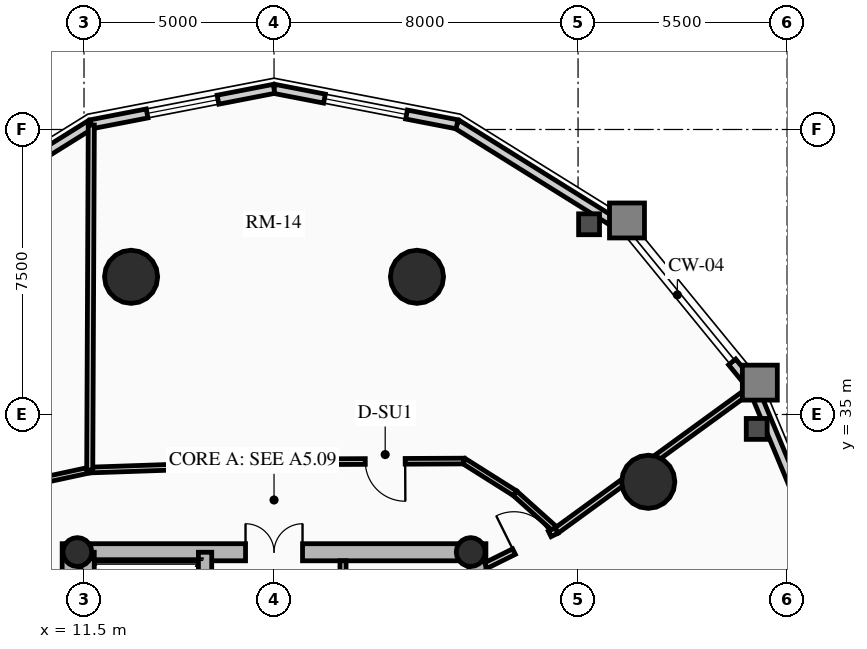
"""IFC4 building model, lengths in metres.
Left out: names, types, materials, properties, quantities, classifications, styles, units other than length and angle.
Written with IfcOpenShell. Run it as: python <this file> out.ifc"""

import sys

from ifc_helpers import new_model, si_unit, direction, frame, frame_2d, origin, origin_2d, place, context, subcontext, project, spatial, rectangle, circle, hollow_circle, extrude, source, transform, mapped, element, fill, save


model = new_model("IFC4")
c1 = context("Model", 3, precision=1e-05, world=origin(), true_north=direction((0.0, 1.0)))
c2 = subcontext(c1, "Body", "Model", "MODEL_VIEW")
j1 = project(units=[si_unit("LENGTHUNIT", "METRE"), si_unit("PLANEANGLEUNIT", "RADIAN")], contexts=[c1])
p1 = place(None, origin())
s1 = spatial("IfcSite", under=j1, at=p1, CompositionType="ELEMENT")
p2 = place(p1, origin())
s2 = spatial("IfcBuilding", under=s1, at=p2, CompositionType="ELEMENT")
p3 = place(p2, frame((0.0, 0.0, 140.32)))
s3 = spatial("IfcBuildingStorey", under=s2, at=p3, CompositionType="ELEMENT", Elevation=140.32)
for number, where, z_axis, x_axis in (
    (1, (11.15, 17.4, 0.0), (0.0, 0.0, 1.0), (0.0, 1.0, 0.0)),
    (2, (21.85, 17.4, 0.0), (0.0, 0.0, 1.0), (0.0, 1.0, 0.0)),
):
    element("IfcWall", number, at=place(p3, frame(where, z_axis=z_axis, x_axis=x_axis)), inside=s3, PredefinedType="SHEAR", context=c2, shape_type="SweptSolid", body=[
        extrude(rectangle(XDim=14.2, YDim=0.45, at=frame_2d((7.1, 0.0))), origin(), (0.0, 0.0, 1.0), 3.72),
    ])
p4 = place(p3, frame((11.15, 31.375, 0.0), z_axis=(0.0, 0.0, 1.0), x_axis=(1.0, 0.0, 0.0)))
e3 = element("IfcWall", 3, at=p4, inside=s3, PredefinedType="SHEAR", context=c2, shape_type="SweptSolid", body=[
    extrude(rectangle(XDim=10.7, YDim=0.45, at=frame_2d((5.35, 0.0))), origin(), (0.0, 0.0, 1.0), 3.72),
])
m1 = source(origin(), c2, "Body", "SweptSolid", [
    extrude(rectangle(XDim=1.5, YDim=2.02, at=frame_2d((0.75, 1.01))), frame((0.0, 0.235, 0.0), z_axis=(0.0, -1.0, 0.0), x_axis=(1.0, 0.0, 0.0)), (0.0, 0.0, 1.0), 0.47),
])
p5 = place(p4, frame((4.6, 0.0, 0.0)))
e4 = element("IfcOpeningElement", 4, at=p5, cuts=e3, PredefinedType="OPENING", context=c2, shape_type="MappedRepresentation", body=[
    mapped(m1, transform((0.0, 0.0, 0.0), x_axis=(1.0, 0.0, 0.0), y_axis=(0.0, 1.0, 0.0), z_axis=(0.0, 0.0, 1.0), scale=1.0)),
])
p6 = place(p3, frame((14.685, 17.625, 0.0), z_axis=(0.0, 0.0, 1.0), x_axis=(0.0, 1.0, 0.0)))
e5 = element("IfcWall", 5, at=p6, inside=s3, PredefinedType="SHEAR", context=c2, shape_type="SweptSolid", body=[
    extrude(rectangle(XDim=13.75, YDim=0.35, at=frame_2d((6.875, 0.0))), origin(), (0.0, 0.0, 1.0), 3.72),
])
m2 = source(origin(), c2, "Body", "SweptSolid", [
    extrude(rectangle(XDim=1.1, YDim=2.015, at=frame_2d((0.55, 1.007))), frame((0.0, 0.185, 0.0), z_axis=(0.0, -1.0, 0.0), x_axis=(1.0, 0.0, 0.0)), (0.0, 0.0, 1.0), 0.37),
])
p7 = place(p6, frame((4.875, 0.0, 0.0)))
e6 = element("IfcOpeningElement", 6, at=p7, cuts=e5, PredefinedType="OPENING", context=c2, shape_type="MappedRepresentation", body=[
    mapped(m2, transform((0.0, 0.0, 0.0), x_axis=(1.0, 0.0, 0.0), y_axis=(0.0, 1.0, 0.0), z_axis=(0.0, 0.0, 1.0), scale=1.0)),
])
p8 = place(p6, frame((0.65, 0.0, 0.0)))
e7 = element("IfcOpeningElement", 7, at=p8, cuts=e5, PredefinedType="OPENING", context=c2, shape_type="MappedRepresentation", body=[
    mapped(m2, transform((0.0, 0.0, 0.0), x_axis=(1.0, 0.0, 0.0), y_axis=(0.0, 1.0, 0.0), z_axis=(0.0, 0.0, 1.0), scale=1.0)),
])
p9 = place(p6, frame((2.65, 0.0, 0.0)))
e8 = element("IfcOpeningElement", 8, at=p9, cuts=e5, PredefinedType="OPENING", context=c2, shape_type="MappedRepresentation", body=[
    mapped(m2, transform((0.0, 0.0, 0.0), x_axis=(1.0, 0.0, 0.0), y_axis=(0.0, 1.0, 0.0), z_axis=(0.0, 0.0, 1.0), scale=1.0)),
])
m3 = source(origin(), c2, "Body", "SweptSolid", [
    extrude(rectangle(XDim=1.15, YDim=2.02, at=frame_2d((0.575, 1.01))), frame((0.0, 0.185, 0.0), z_axis=(0.0, -1.0, 0.0), x_axis=(1.0, 0.0, 0.0)), (0.0, 0.0, 1.0), 0.37),
])
p10 = place(p6, frame((7.295, 0.0, 0.0)))
e9 = element("IfcOpeningElement", 9, at=p10, cuts=e5, PredefinedType="OPENING", context=c2, shape_type="MappedRepresentation", body=[
    mapped(m3, transform((0.0, 0.0, 0.0), x_axis=(1.0, 0.0, 0.0), y_axis=(0.0, 1.0, 0.0), z_axis=(0.0, 0.0, 1.0), scale=1.0)),
])
p11 = place(p3, frame((11.595, 24.655, 0.0), z_axis=(0.0, 0.0, 1.0), x_axis=(0.0, 1.0, 0.0)))
e10 = element("IfcWall", 10, at=p11, inside=s3, PredefinedType="SHEAR", context=c2, shape_type="SweptSolid", body=[
    extrude(rectangle(XDim=6.72, YDim=0.35, at=frame_2d((3.36, 0.0))), origin(), (0.0, 0.0, 1.0), 3.72),
])
for number, where, z_axis, x_axis in (
    (11, (11.325, 31.38, 0.0), (0.0, 0.0, 1.0), (1.0, 0.0, 0.0)),
    (12, (21.675, 31.38, 0.0), (0.0, 0.0, 1.0), (1.0, 0.0, 0.0)),
):
    element("IfcColumn", number, at=place(p3, frame(where, z_axis=z_axis, x_axis=x_axis)), inside=s3, PredefinedType="COLUMN", context=c2, shape_type="SweptSolid", body=[
        extrude(hollow_circle(Radius=0.38, WallThickness=0.032, at=origin_2d()), origin(), (0.0, 0.0, 1.0), 3.72),
    ])
for number, where, z_axis, x_axis in (
    (13, (26.347, 33.229, 0.0), (0.0, 0.0, 1.0), (1.0, 0.0, 0.0)),
    (14, (20.261, 38.623, 0.0), (0.0, 0.0, 1.0), (1.0, 0.0, 0.0)),
    (15, (12.739, 38.623, 0.0), (0.0, 0.0, 1.0), (1.0, 0.0, 0.0)),
):
    element("IfcColumn", number, at=place(p3, frame(where, z_axis=z_axis, x_axis=x_axis)), inside=s3, PredefinedType="USERDEFINED", context=c2, shape_type="SweptSolid", body=[
        extrude(circle(Radius=0.7, at=origin_2d()), origin(), (0.0, 0.0, 1.0), 3.72),
    ])
p12 = place(p3, frame((29.105, 35.709, 0.0), z_axis=(0.0, 0.0, 1.0), x_axis=(0.384344417632, -0.923189779317, 0.0)))
e16 = element("IfcWall", 16, at=p12, inside=s3, PredefinedType="SOLIDWALL", context=c2, shape_type="SweptSolid", body=[
    extrude(rectangle(XDim=5.758, YDim=0.24, at=frame_2d((2.879, 0.0))), origin(), (0.0, 0.0, 1.0), 3.465),
])
p13 = place(p3, frame((28.555, 36.383, 0.0), z_axis=(0.0, 0.0, 1.0), x_axis=(0.632702874536, -0.774394649099, 0.0)))
e17 = element("IfcWall", 17, at=p13, inside=s3, PredefinedType="SOLIDWALL", context=c2, shape_type="SweptSolid", body=[
    extrude(rectangle(XDim=0.87, YDim=0.24, at=frame_2d((0.435, 0.0))), origin(), (0.0, 0.0, 1.0), 3.465),
])
p14 = place(p3, frame((21.315, 42.637, 0.0), z_axis=(0.0, 0.0, 1.0), x_axis=(0.848520380187, -0.529162701263, 0.0)))
e18 = element("IfcWall", 18, at=p14, inside=s3, PredefinedType="SOLIDWALL", context=c2, shape_type="SweptSolid", body=[
    extrude(rectangle(XDim=5.119, YDim=0.24, at=frame_2d((2.56, 0.0))), origin(), (0.0, 0.0, 1.0), 3.465),
])
p15 = place(p3, frame((16.5, 43.57, 0.0), z_axis=(0.0, 0.0, 1.0), x_axis=(0.981723785992, -0.190311344954, 0.0)))
e19 = element("IfcWall", 19, at=p15, inside=s3, PredefinedType="SOLIDWALL", context=c2, shape_type="SweptSolid", body=[
    extrude(rectangle(XDim=4.904, YDim=0.24, at=frame_2d((2.452, 0.0))), origin(), (0.0, 0.0, 1.0), 3.465),
])
m4 = source(origin(), c2, "Body", "SweptSolid", [
    extrude(rectangle(XDim=2.2, YDim=1.35, at=frame_2d((1.1, 0.675))), frame((0.0, 0.13, 0.0), z_axis=(0.0, -1.0, 0.0), x_axis=(1.0, 0.0, 0.0)), (0.0, 0.0, 1.0), 0.26),
])
p16 = place(p15, frame((1.352, 0.0, 0.65)))
e20 = element("IfcOpeningElement", 20, at=p16, cuts=e19, PredefinedType="OPENING", context=c2, shape_type="MappedRepresentation", body=[
    mapped(m4, transform((0.0, 0.0, 0.0), x_axis=(1.0, 0.0, 0.0), y_axis=(0.0, 1.0, 0.0), z_axis=(0.0, 0.0, 1.0), scale=1.0)),
])
p17 = place(p3, frame((11.685, 42.637, 0.0), z_axis=(0.0, 0.0, 1.0), x_axis=(0.981723785992, 0.190311344954, 0.0)))
e21 = element("IfcWall", 21, at=p17, inside=s3, PredefinedType="SOLIDWALL", context=c2, shape_type="SweptSolid", body=[
    extrude(rectangle(XDim=4.904, YDim=0.24, at=frame_2d((2.452, 0.0))), origin(), (0.0, 0.0, 1.0), 3.465),
])
m5 = source(origin(), c2, "Body", "SweptSolid", [
    extrude(rectangle(XDim=1.9, YDim=1.35, at=frame_2d((0.95, 0.675))), frame((0.0, 0.13, 0.0), z_axis=(0.0, -1.0, 0.0), x_axis=(1.0, 0.0, 0.0)), (0.0, 0.0, 1.0), 0.26),
])
p18 = place(p17, frame((1.502, 0.0, 0.65)))
e22 = element("IfcOpeningElement", 22, at=p18, cuts=e21, PredefinedType="OPENING", context=c2, shape_type="MappedRepresentation", body=[
    mapped(m5, transform((0.0, 0.0, 0.0), x_axis=(1.0, 0.0, 0.0), y_axis=(0.0, 1.0, 0.0), z_axis=(0.0, 0.0, 1.0), scale=1.0)),
])
p19 = place(p3, frame((7.342, 39.928, 0.0), z_axis=(0.0, 0.0, 1.0), x_axis=(0.848520380187, 0.529162701263, 0.0)))
e23 = element("IfcWall", 23, at=p19, inside=s3, PredefinedType="SOLIDWALL", context=c2, shape_type="SweptSolid", body=[
    extrude(rectangle(XDim=5.119, YDim=0.24, at=frame_2d((2.56, 0.0))), origin(), (0.0, 0.0, 1.0), 3.465),
])
p20 = place(p3, frame((18.315, 27.25, 0.0), z_axis=(0.0, 0.0, 1.0), x_axis=(0.0, 1.0, 0.0)))
e24 = element("IfcWall", 24, at=p20, inside=s3, PredefinedType="PARTITIONING", context=c2, shape_type="SweptSolid", body=[
    extrude(rectangle(XDim=3.9, YDim=0.16, at=frame_2d((1.95, 0.0))), origin(), (0.0, 0.0, 1.0), 3.465),
])
m6 = source(origin(), c2, "Body", "SweptSolid", [
    extrude(rectangle(XDim=0.9, YDim=2.005, at=frame_2d((0.45, 1.002))), frame((0.0, 0.09, 0.0), z_axis=(0.0, -1.0, 0.0), x_axis=(1.0, 0.0, 0.0)), (0.0, 0.0, 1.0), 0.18),
])
p21 = place(p20, frame((0.55, 0.0, 0.0)))
e25 = element("IfcOpeningElement", 25, at=p21, cuts=e24, PredefinedType="OPENING", context=c2, shape_type="MappedRepresentation", body=[
    mapped(m6, transform((0.0, 0.0, 0.0), x_axis=(1.0, 0.0, 0.0), y_axis=(0.0, 1.0, 0.0), z_axis=(0.0, 0.0, 1.0), scale=1.0)),
])
p22 = place(p20, frame((2.35, 0.0, 0.0)))
e26 = element("IfcOpeningElement", 26, at=p22, cuts=e24, PredefinedType="OPENING", context=c2, shape_type="MappedRepresentation", body=[
    mapped(m6, transform((0.0, 0.0, 0.0), x_axis=(1.0, 0.0, 0.0), y_axis=(0.0, 1.0, 0.0), z_axis=(0.0, 0.0, 1.0), scale=1.0)),
])
p23 = place(p3, frame((23.933, 31.946, 0.0), z_axis=(0.0, 0.0, 1.0), x_axis=(-0.744529651383, 0.667589393423, 0.0)))
e27 = element("IfcWall", 27, at=p23, inside=s3, PredefinedType="PARTITIONING", context=c2, shape_type="SweptSolid", body=[
    extrude(rectangle(XDim=1.472, YDim=0.15, at=frame_2d((0.736, 0.0))), origin(), (0.0, 0.0, 1.0), 3.035),
])
p24 = place(p3, frame((22.837, 32.929, 0.0), z_axis=(0.0, 0.0, 1.0), x_axis=(-0.84581079329, 0.533482991252, 0.0)))
e28 = element("IfcWall", 28, at=p24, inside=s3, PredefinedType="PARTITIONING", context=c2, shape_type="SweptSolid", body=[
    extrude(rectangle(XDim=1.585, YDim=0.15, at=frame_2d((0.792, 0.0))), origin(), (0.0, 0.0, 1.0), 3.035),
])
p25 = place(p3, frame((21.496, 33.775, 0.0), z_axis=(0.0, 0.0, 1.0), x_axis=(-0.999989544737, -0.004572790979, 0.0)))
e29 = element("IfcWall", 29, at=p25, inside=s3, PredefinedType="PARTITIONING", context=c2, shape_type="SweptSolid", body=[
    extrude(rectangle(XDim=3.364, YDim=0.15, at=frame_2d((1.682, 0.0))), origin(), (0.0, 0.0, 1.0), 3.035),
])
m7 = source(origin(), c2, "Body", "SweptSolid", [
    extrude(rectangle(XDim=1.05, YDim=2.015, at=frame_2d((0.525, 1.007))), frame((0.0, 0.085, 0.0), z_axis=(0.0, -1.0, 0.0), x_axis=(1.0, 0.0, 0.0)), (0.0, 0.0, 1.0), 0.17),
])
p26 = place(p25, frame((1.546, 0.0, 0.0)))
e30 = element("IfcOpeningElement", 30, at=p26, cuts=e29, PredefinedType="OPENING", context=c2, shape_type="MappedRepresentation", body=[
    mapped(m7, transform((0.0, 0.0, 0.0), x_axis=(1.0, 0.0, 0.0), y_axis=(0.0, 1.0, 0.0), z_axis=(0.0, 0.0, 1.0), scale=1.0)),
])
p27 = place(p3, frame((18.133, 33.76, 0.0), z_axis=(0.0, 0.0, 1.0), x_axis=(-0.999419643988, -0.034064280574, 0.0)))
e31 = element("IfcWall", 31, at=p27, inside=s3, PredefinedType="PARTITIONING", context=c2, shape_type="SweptSolid", body=[
    extrude(rectangle(XDim=6.486, YDim=0.15, at=frame_2d((3.243, 0.0))), origin(), (0.0, 0.0, 1.0), 3.035),
])
p28 = place(p3, frame((11.65, 33.539, 0.0), z_axis=(0.0, 0.0, 1.0), x_axis=(-0.977535921581, -0.210768882949, 0.0)))
e32 = element("IfcWall", 32, at=p28, inside=s3, PredefinedType="PARTITIONING", context=c2, shape_type="SweptSolid", body=[
    extrude(rectangle(XDim=1.923, YDim=0.15, at=frame_2d((0.961, 0.0))), origin(), (0.0, 0.0, 1.0), 3.035),
])
p29 = place(p3, frame((23.933, 31.946, 0.0), z_axis=(0.0, 0.0, 1.0), x_axis=(0.808636722237, 0.588308296261, 0.0)))
e33 = element("IfcWall", 33, at=p29, inside=s3, PredefinedType="PARTITIONING", context=c2, shape_type="SweptSolid", body=[
    extrude(rectangle(XDim=6.376, YDim=0.16, at=frame_2d((3.188, 0.0))), origin(), (0.0, 0.0, 1.0), 2.989),
])
p30 = place(p3, frame((11.65, 33.539, 0.0), z_axis=(0.0, 0.0, 1.0), x_axis=(0.00451754022, 0.999989795863, 0.0)))
e34 = element("IfcWall", 34, at=p30, inside=s3, PredefinedType="PARTITIONING", context=c2, shape_type="SweptSolid", body=[
    extrude(rectangle(XDim=9.079, YDim=0.16, at=frame_2d((4.54, 0.0))), origin(), (0.0, 0.0, 1.0), 2.989),
])
p31 = place(p3, frame((22.075, 31.025, 0.0), z_axis=(0.0, 0.0, 1.0), x_axis=(0.8959286695, 0.444197950432, 0.0)))
e35 = element("IfcWall", 35, at=p31, inside=s3, PredefinedType="PARTITIONING", context=c2, shape_type="SweptSolid", body=[
    extrude(rectangle(XDim=2.074, YDim=0.16, at=frame_2d((1.037, 0.0))), origin(), (0.0, 0.0, 1.0), 3.035),
])
m8 = source(origin(), c2, "Body", "SweptSolid", [
    extrude(rectangle(XDim=1.05, YDim=2.015, at=frame_2d((0.525, 1.007))), frame((0.0, 0.09, 0.0), z_axis=(0.0, -1.0, 0.0), x_axis=(1.0, 0.0, 0.0)), (0.0, 0.0, 1.0), 0.18),
])
p32 = place(p31, frame((0.824, 0.0, 0.0)))
e36 = element("IfcOpeningElement", 36, at=p32, cuts=e35, PredefinedType="OPENING", context=c2, shape_type="MappedRepresentation", body=[
    mapped(m8, transform((0.0, 0.0, 0.0), x_axis=(1.0, 0.0, 0.0), y_axis=(0.0, 1.0, 0.0), z_axis=(0.0, 0.0, 1.0), scale=1.0)),
])
m9 = source(origin(), c2, "Body", "SweptSolid", [
    extrude(rectangle(XDim=2.2, YDim=1.35, at=frame_2d((1.1, 0.675))), frame((0.0, 0.03, 0.0), z_axis=(0.0, -1.0, 0.0), x_axis=(1.0, 0.0, 0.0)), (0.0, 0.0, 1.0), 0.06),
])
p33 = place(p16, origin())
e37 = element("IfcWindow", 37, at=p33, inside=s3, PartitioningType="DOUBLE_PANEL_VERTICAL", PredefinedType="WINDOW", context=c2, shape_type="MappedRepresentation", body=[
    mapped(m9, transform((0.0, 0.0, 0.0), x_axis=(1.0, 0.0, 0.0), y_axis=(0.0, 1.0, 0.0), z_axis=(0.0, 0.0, 1.0), scale=1.0)),
])
fill(e20, e37)
m10 = source(origin(), c2, "Body", "SweptSolid", [
    extrude(rectangle(XDim=1.9, YDim=1.35, at=frame_2d((0.95, 0.675))), frame((0.0, 0.03, 0.0), z_axis=(0.0, -1.0, 0.0), x_axis=(1.0, 0.0, 0.0)), (0.0, 0.0, 1.0), 0.06),
])
p34 = place(p18, origin())
e38 = element("IfcWindow", 38, at=p34, inside=s3, PartitioningType="DOUBLE_PANEL_VERTICAL", PredefinedType="WINDOW", context=c2, shape_type="MappedRepresentation", body=[
    mapped(m10, transform((0.0, 0.0, 0.0), x_axis=(1.0, 0.0, 0.0), y_axis=(0.0, 1.0, 0.0), z_axis=(0.0, 0.0, 1.0), scale=1.0)),
])
fill(e22, e38)
m11 = source(origin(), c2, "Body", "SweptSolid", [
    extrude(rectangle(XDim=1.5, YDim=2.02, at=frame_2d((0.75, 1.01))), frame((0.0, 0.025, 0.0), z_axis=(0.0, -1.0, 0.0), x_axis=(1.0, 0.0, 0.0)), (0.0, 0.0, 1.0), 0.05),
])
p35 = place(p5, origin())
e39 = element("IfcDoor", 39, at=p35, inside=s3, OperationType="DOUBLE_DOOR_SINGLE_SWING", PredefinedType="DOOR", context=c2, shape_type="MappedRepresentation", body=[
    mapped(m11, transform((0.0, 0.0, 0.0), x_axis=(1.0, 0.0, 0.0), y_axis=(0.0, 1.0, 0.0), z_axis=(0.0, 0.0, 1.0), scale=1.0)),
])
fill(e4, e39)
m12 = source(origin(), c2, "Body", "SweptSolid", [
    extrude(rectangle(XDim=1.05, YDim=2.015, at=frame_2d((0.525, 1.007))), frame((0.0, 0.025, 0.0), z_axis=(0.0, -1.0, 0.0), x_axis=(1.0, 0.0, 0.0)), (0.0, 0.0, 1.0), 0.05),
])
p36 = place(p32, origin())
e40 = element("IfcDoor", 40, at=p36, inside=s3, OperationType="SINGLE_SWING_LEFT", PredefinedType="DOOR", context=c2, shape_type="MappedRepresentation", body=[
    mapped(m12, transform((0.0, 0.0, 0.0), x_axis=(1.0, 0.0, 0.0), y_axis=(0.0, 1.0, 0.0), z_axis=(0.0, 0.0, 1.0), scale=1.0)),
])
fill(e36, e40)
p37 = place(p26, origin())
e41 = element("IfcDoor", 41, at=p37, inside=s3, OperationType="SINGLE_SWING_LEFT", PredefinedType="DOOR", context=c2, shape_type="MappedRepresentation", body=[
    mapped(m12, transform((0.0, 0.0, 0.0), x_axis=(1.0, 0.0, 0.0), y_axis=(0.0, 1.0, 0.0), z_axis=(0.0, 0.0, 1.0), scale=1.0)),
])
fill(e30, e41)
save(model, sys.argv[1])
